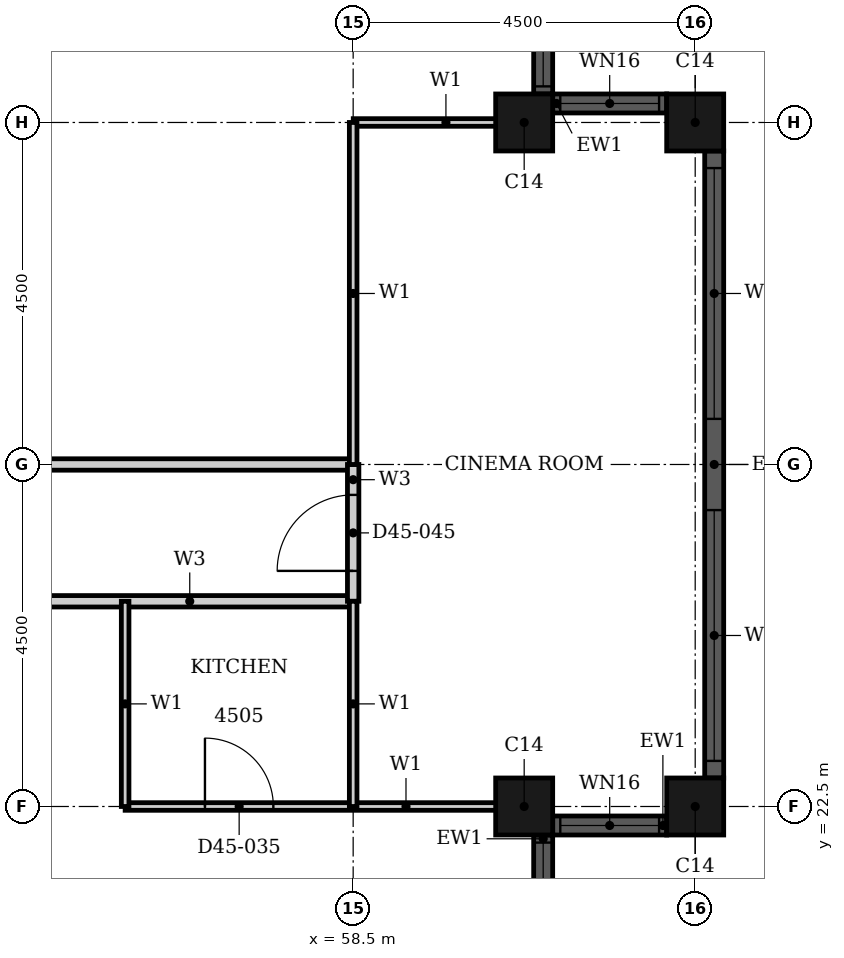
"""IFC4 building model, lengths in metres.
Left out: names, types, materials, properties, quantities, classifications, styles, units other than length and angle.
Written with IfcOpenShell. Run it as: python <this file> out.ifc"""

import sys

from ifc_helpers import new_model, si_unit, direction, frame, frame_2d, origin, origin_2d, place, context, subcontext, project, spatial, rectangle, hollow_rectangle, extrude, element, fill, save


model = new_model("IFC4")
c1 = context("Model", 3, precision=1e-05, world=origin(), true_north=direction((0.0, 1.0)))
c2 = subcontext(c1, "Body", "Model", "MODEL_VIEW")
j1 = project(units=[si_unit("LENGTHUNIT", "METRE"), si_unit("PLANEANGLEUNIT", "RADIAN")], contexts=[c1])
p1 = place(None, origin())
s1 = spatial("IfcSite", under=j1, at=p1, CompositionType="ELEMENT")
p2 = place(p1, origin())
s2 = spatial("IfcBuilding", under=s1, at=p2, CompositionType="ELEMENT")
p3 = place(p2, frame((0.0, 0.0, 180.2)))
s3 = spatial("IfcBuildingStorey", under=s2, at=p3, CompositionType="ELEMENT", Elevation=180.2)
for number, where, z_axis, x_axis in (
    (1, (60.75, 22.5, 0.0), (0.0, 0.0, 1.0), (1.0, 0.0, 0.0)),
    (2, (63.0, 22.5, 0.0), (0.0, 0.0, 1.0), (1.0, 0.0, 0.0)),
    (3, (63.0, 31.5, 0.0), (0.0, 0.0, 1.0), (1.0, 0.0, 0.0)),
    (4, (60.75, 31.5, 0.0), (0.0, 0.0, 1.0), (1.0, 0.0, 0.0)),
):
    element("IfcColumn", number, at=place(p3, frame(where, z_axis=z_axis, x_axis=x_axis)), inside=s3, PredefinedType="COLUMN", context=c2, shape_type="SweptSolid", body=[
        extrude(hollow_rectangle(XDim=0.75, YDim=0.75, WallThickness=0.024, at=origin_2d()), origin(), (0.0, 0.0, 1.0), 3.7),
    ])
p4 = place(p3, frame((61.0, 20.625, 0.0), z_axis=(0.0, 0.0, 1.0), x_axis=(0.0, 1.0, 0.0)))
e5 = element("IfcWall", 5, at=p4, inside=s3, PredefinedType="SOLIDWALL", context=c2, shape_type="SweptSolid", body=[
    extrude(rectangle(XDim=1.5, YDim=0.25, at=frame_2d((0.75, 0.0))), origin(), (0.0, 0.0, 1.0), 3.7),
])
p5 = place(p4, frame((0.1, 0.0, 0.9)))
e6 = element("IfcOpeningElement", 6, at=p5, cuts=e5, PredefinedType="OPENING", context=c2, shape_type="SweptSolid", body=[
    extrude(rectangle(XDim=1.3, YDim=1.85, at=frame_2d((0.65, 0.925))), frame((0.0, 0.135, 0.0), z_axis=(0.0, -1.0, 0.0), x_axis=(1.0, 0.0, 0.0)), (0.0, 0.0, 1.0), 0.27),
])
p6 = place(p3, frame((61.125, 22.25, 0.0), z_axis=(0.0, 0.0, 1.0), x_axis=(1.0, 0.0, 0.0)))
e7 = element("IfcWall", 7, at=p6, inside=s3, PredefinedType="SOLIDWALL", context=c2, shape_type="SweptSolid", body=[
    extrude(rectangle(XDim=1.5, YDim=0.25, at=frame_2d((0.75, 0.0))), origin(), (0.0, 0.0, 1.0), 3.7),
])
p7 = place(p6, frame((0.1, 0.0, 0.9)))
e8 = element("IfcOpeningElement", 8, at=p7, cuts=e7, PredefinedType="OPENING", context=c2, shape_type="SweptSolid", body=[
    extrude(rectangle(XDim=1.3, YDim=1.85, at=frame_2d((0.65, 0.925))), frame((0.0, 0.135, 0.0), z_axis=(0.0, -1.0, 0.0), x_axis=(1.0, 0.0, 0.0)), (0.0, 0.0, 1.0), 0.27),
])
p8 = place(p3, frame((63.25, 22.875, 0.0), z_axis=(0.0, 0.0, 1.0), x_axis=(0.0, 1.0, 0.0)))
e9 = element("IfcWall", 9, at=p8, inside=s3, PredefinedType="SOLIDWALL", context=c2, shape_type="SweptSolid", body=[
    extrude(rectangle(XDim=8.25, YDim=0.25, at=frame_2d((4.125, 0.0))), origin(), (0.0, 0.0, 1.0), 3.7),
])
p9 = place(p8, frame((0.225, 0.0, 0.45)))
e10 = element("IfcOpeningElement", 10, at=p9, cuts=e9, PredefinedType="OPENING", context=c2, shape_type="SweptSolid", body=[
    extrude(rectangle(XDim=3.3, YDim=2.3, at=frame_2d((1.65, 1.15))), frame((0.0, 0.135, 0.0), z_axis=(0.0, -1.0, 0.0), x_axis=(1.0, 0.0, 0.0)), (0.0, 0.0, 1.0), 0.27),
])
p10 = place(p8, frame((4.725, 0.0, 0.45)))
e11 = element("IfcOpeningElement", 11, at=p10, cuts=e9, PredefinedType="OPENING", context=c2, shape_type="SweptSolid", body=[
    extrude(rectangle(XDim=3.3, YDim=2.3, at=frame_2d((1.65, 1.15))), frame((0.0, 0.135, 0.0), z_axis=(0.0, -1.0, 0.0), x_axis=(1.0, 0.0, 0.0)), (0.0, 0.0, 1.0), 0.27),
])
p11 = place(p3, frame((62.625, 31.75, 0.0), z_axis=(0.0, 0.0, 1.0), x_axis=(-1.0, 0.0, 0.0)))
e12 = element("IfcWall", 12, at=p11, inside=s3, PredefinedType="SOLIDWALL", context=c2, shape_type="SweptSolid", body=[
    extrude(rectangle(XDim=1.5, YDim=0.25, at=frame_2d((0.75, 0.0))), origin(), (0.0, 0.0, 1.0), 3.7),
])
p12 = place(p11, frame((0.1, 0.0, 0.9)))
e13 = element("IfcOpeningElement", 13, at=p12, cuts=e12, PredefinedType="OPENING", context=c2, shape_type="SweptSolid", body=[
    extrude(rectangle(XDim=1.3, YDim=1.85, at=frame_2d((0.65, 0.925))), frame((0.0, 0.135, 0.0), z_axis=(0.0, -1.0, 0.0), x_axis=(1.0, 0.0, 0.0)), (0.0, 0.0, 1.0), 0.27),
])
p13 = place(p3, frame((61.0, 31.875, 0.0), z_axis=(0.0, 0.0, 1.0), x_axis=(0.0, 1.0, 0.0)))
e14 = element("IfcWall", 14, at=p13, inside=s3, PredefinedType="SOLIDWALL", context=c2, shape_type="SweptSolid", body=[
    extrude(rectangle(XDim=1.5, YDim=0.25, at=frame_2d((0.75, 0.0))), origin(), (0.0, 0.0, 1.0), 3.7),
])
p14 = place(p13, frame((0.1, 0.0, 0.9)))
e15 = element("IfcOpeningElement", 15, at=p14, cuts=e14, PredefinedType="OPENING", context=c2, shape_type="SweptSolid", body=[
    extrude(rectangle(XDim=1.3, YDim=1.85, at=frame_2d((0.65, 0.925))), frame((0.0, 0.135, 0.0), z_axis=(0.0, -1.0, 0.0), x_axis=(1.0, 0.0, 0.0)), (0.0, 0.0, 1.0), 0.27),
])
p15 = place(p3, frame((51.9, 25.2, 0.0), z_axis=(0.0, 0.0, 1.0), x_axis=(1.0, 0.0, 0.0)))
e16 = element("IfcWall", 16, at=p15, inside=s3, PredefinedType="PARTITIONING", context=c2, shape_type="SweptSolid", body=[
    extrude(rectangle(XDim=6.6, YDim=0.15, at=frame_2d((3.3, 0.0))), origin(), (0.0, 0.0, 1.0), 3.4),
])
p16 = place(p15, frame((1.3, 0.0, 0.0)))
e17 = element("IfcOpeningElement", 17, at=p16, cuts=e16, PredefinedType="OPENING", context=c2, shape_type="SweptSolid", body=[
    extrude(rectangle(XDim=1.0, YDim=2.2, at=frame_2d((0.5, 1.1))), frame((0.0, 0.085, 0.0), z_axis=(0.0, -1.0, 0.0), x_axis=(1.0, 0.0, 0.0)), (0.0, 0.0, 1.0), 0.17),
])
p17 = place(p3, frame((45.0, 27.0, 0.0), z_axis=(0.0, 0.0, 1.0), x_axis=(1.0, 0.0, 0.0)))
e18 = element("IfcWall", 18, at=p17, inside=s3, PredefinedType="PARTITIONING", context=c2, shape_type="SweptSolid", body=[
    extrude(rectangle(XDim=13.5, YDim=0.15, at=frame_2d((6.75, 0.0))), origin(), (0.0, 0.0, 1.0), 2.68),
])
p18 = place(p17, frame((7.15, 0.0, 0.0)))
e19 = element("IfcOpeningElement", 19, at=p18, cuts=e18, PredefinedType="OPENING", context=c2, shape_type="SweptSolid", body=[
    extrude(rectangle(XDim=1.0, YDim=2.1, at=frame_2d((0.5, 1.05))), frame((0.0, 0.085, 0.0), z_axis=(0.0, -1.0, 0.0), x_axis=(1.0, 0.0, 0.0)), (0.0, 0.0, 1.0), 0.17),
])
p19 = place(p3, frame((58.5, 25.2, 0.0), z_axis=(0.0, 0.0, 1.0), x_axis=(0.0, 1.0, 0.0)))
e20 = element("IfcWall", 20, at=p19, inside=s3, PredefinedType="PARTITIONING", context=c2, shape_type="SweptSolid", body=[
    extrude(rectangle(XDim=1.8, YDim=0.15, at=frame_2d((0.9, 0.0))), origin(), (0.0, 0.0, 1.0), 3.4),
])
p20 = place(p19, frame((0.4, 0.0, 0.0)))
e21 = element("IfcOpeningElement", 21, at=p20, cuts=e20, PredefinedType="OPENING", context=c2, shape_type="SweptSolid", body=[
    extrude(rectangle(XDim=1.0, YDim=2.1, at=frame_2d((0.5, 1.05))), frame((0.0, 0.085, 0.0), z_axis=(0.0, -1.0, 0.0), x_axis=(1.0, 0.0, 0.0)), (0.0, 0.0, 1.0), 0.17),
])
p21 = place(p3, frame((55.5, 22.5, 0.0), z_axis=(0.0, 0.0, 1.0), x_axis=(1.0, 0.0, 0.0)))
e22 = element("IfcWall", 22, at=p21, inside=s3, PredefinedType="PARTITIONING", context=c2, shape_type="SweptSolid", body=[
    extrude(rectangle(XDim=5.44, YDim=0.1, at=frame_2d((2.72, 0.0))), origin(), (0.0, 0.0, 1.0), 2.68),
])
p22 = place(p21, frame((1.05, 0.0, 0.0)))
e23 = element("IfcOpeningElement", 23, at=p22, cuts=e22, PredefinedType="OPENING", context=c2, shape_type="SweptSolid", body=[
    extrude(rectangle(XDim=0.9, YDim=2.1, at=frame_2d((0.45, 1.05))), frame((0.0, 0.06, 0.0), z_axis=(0.0, -1.0, 0.0), x_axis=(1.0, 0.0, 0.0)), (0.0, 0.0, 1.0), 0.12),
])
p23 = place(p3, frame((58.501, 31.5, 0.0), z_axis=(0.0, 0.0, 1.0), x_axis=(1.0, 0.0, 0.0)))
e24 = element("IfcWall", 24, at=p23, inside=s3, PredefinedType="PARTITIONING", context=c2, shape_type="SweptSolid", body=[
    extrude(rectangle(XDim=2.439, YDim=0.1, at=frame_2d((1.219, 0.0))), origin(), (0.0, 0.0, 1.0), 2.68),
])
p24 = place(p3, frame((55.5, 22.5, 0.0), z_axis=(0.0, 0.0, 1.0), x_axis=(0.0, 1.0, 0.0)))
e25 = element("IfcWall", 25, at=p24, inside=s3, PredefinedType="PARTITIONING", context=c2, shape_type="SweptSolid", body=[
    extrude(rectangle(XDim=2.7, YDim=0.1, at=frame_2d((1.35, 0.0))), origin(), (0.0, 0.0, 1.0), 3.4),
])
p25 = place(p3, frame((58.5, 27.0, 0.0), z_axis=(0.0, 0.0, 1.0), x_axis=(0.0, 1.0, 0.0)))
e26 = element("IfcWall", 26, at=p25, inside=s3, PredefinedType="PARTITIONING", context=c2, shape_type="SweptSolid", body=[
    extrude(rectangle(XDim=4.5, YDim=0.1, at=frame_2d((2.25, 0.0))), origin(), (0.0, 0.0, 1.0), 3.4),
])
p26 = place(p3, frame((58.5, 22.5, 0.0), z_axis=(0.0, 0.0, 1.0), x_axis=(0.0, 1.0, 0.0)))
e27 = element("IfcWall", 27, at=p26, inside=s3, PredefinedType="PARTITIONING", context=c2, shape_type="SweptSolid", body=[
    extrude(rectangle(XDim=2.7, YDim=0.1, at=frame_2d((1.35, 0.0))), origin(), (0.0, 0.0, 1.0), 3.4),
])
p27 = place(p5, origin())
e28 = element("IfcWindow", 28, at=p27, inside=s3, PartitioningType="SINGLE_PANEL", PredefinedType="WINDOW", context=c2, shape_type="SweptSolid", body=[
    extrude(rectangle(XDim=1.3, YDim=1.85, at=frame_2d((0.65, 0.925))), frame((0.0, 0.03, 0.0), z_axis=(0.0, -1.0, 0.0), x_axis=(1.0, 0.0, 0.0)), (0.0, 0.0, 1.0), 0.06),
])
fill(e6, e28)
p28 = place(p7, origin())
e29 = element("IfcWindow", 29, at=p28, inside=s3, PartitioningType="SINGLE_PANEL", PredefinedType="WINDOW", context=c2, shape_type="SweptSolid", body=[
    extrude(rectangle(XDim=1.3, YDim=1.85, at=frame_2d((0.65, 0.925))), frame((0.0, 0.03, 0.0), z_axis=(0.0, -1.0, 0.0), x_axis=(1.0, 0.0, 0.0)), (0.0, 0.0, 1.0), 0.06),
])
fill(e8, e29)
p29 = place(p9, origin())
e30 = element("IfcWindow", 30, at=p29, inside=s3, PartitioningType="SINGLE_PANEL", PredefinedType="WINDOW", context=c2, shape_type="SweptSolid", body=[
    extrude(rectangle(XDim=3.3, YDim=2.3, at=frame_2d((1.65, 1.15))), frame((0.0, 0.03, 0.0), z_axis=(0.0, -1.0, 0.0), x_axis=(1.0, 0.0, 0.0)), (0.0, 0.0, 1.0), 0.06),
])
fill(e10, e30)
p30 = place(p10, origin())
e31 = element("IfcWindow", 31, at=p30, inside=s3, PartitioningType="SINGLE_PANEL", PredefinedType="WINDOW", context=c2, shape_type="SweptSolid", body=[
    extrude(rectangle(XDim=3.3, YDim=2.3, at=frame_2d((1.65, 1.15))), frame((0.0, 0.03, 0.0), z_axis=(0.0, -1.0, 0.0), x_axis=(1.0, 0.0, 0.0)), (0.0, 0.0, 1.0), 0.06),
])
fill(e11, e31)
p31 = place(p12, origin())
e32 = element("IfcWindow", 32, at=p31, inside=s3, PartitioningType="SINGLE_PANEL", PredefinedType="WINDOW", context=c2, shape_type="SweptSolid", body=[
    extrude(rectangle(XDim=1.3, YDim=1.85, at=frame_2d((0.65, 0.925))), frame((0.0, 0.03, 0.0), z_axis=(0.0, -1.0, 0.0), x_axis=(1.0, 0.0, 0.0)), (0.0, 0.0, 1.0), 0.06),
])
fill(e13, e32)
p32 = place(p14, origin())
e33 = element("IfcWindow", 33, at=p32, inside=s3, PartitioningType="SINGLE_PANEL", PredefinedType="WINDOW", context=c2, shape_type="SweptSolid", body=[
    extrude(rectangle(XDim=1.3, YDim=1.85, at=frame_2d((0.65, 0.925))), frame((0.0, 0.03, 0.0), z_axis=(0.0, -1.0, 0.0), x_axis=(1.0, 0.0, 0.0)), (0.0, 0.0, 1.0), 0.06),
])
fill(e15, e33)
p33 = place(p22, origin())
e34 = element("IfcDoor", 34, at=p33, inside=s3, OperationType="SINGLE_SWING_RIGHT", PredefinedType="DOOR", context=c2, shape_type="SweptSolid", body=[
    extrude(rectangle(XDim=0.9, YDim=2.1, at=frame_2d((0.45, 1.05))), frame((0.0, 0.025, 0.0), z_axis=(0.0, -1.0, 0.0), x_axis=(1.0, 0.0, 0.0)), (0.0, 0.0, 1.0), 0.05),
])
fill(e23, e34)
p34 = place(p20, origin())
e35 = element("IfcDoor", 35, at=p34, inside=s3, OperationType="SINGLE_SWING_RIGHT", PredefinedType="DOOR", context=c2, shape_type="SweptSolid", body=[
    extrude(rectangle(XDim=1.0, YDim=2.1, at=frame_2d((0.5, 1.05))), frame((0.0, 0.025, 0.0), z_axis=(0.0, -1.0, 0.0), x_axis=(1.0, 0.0, 0.0)), (0.0, 0.0, 1.0), 0.05),
])
fill(e21, e35)
save(model, sys.argv[1])
